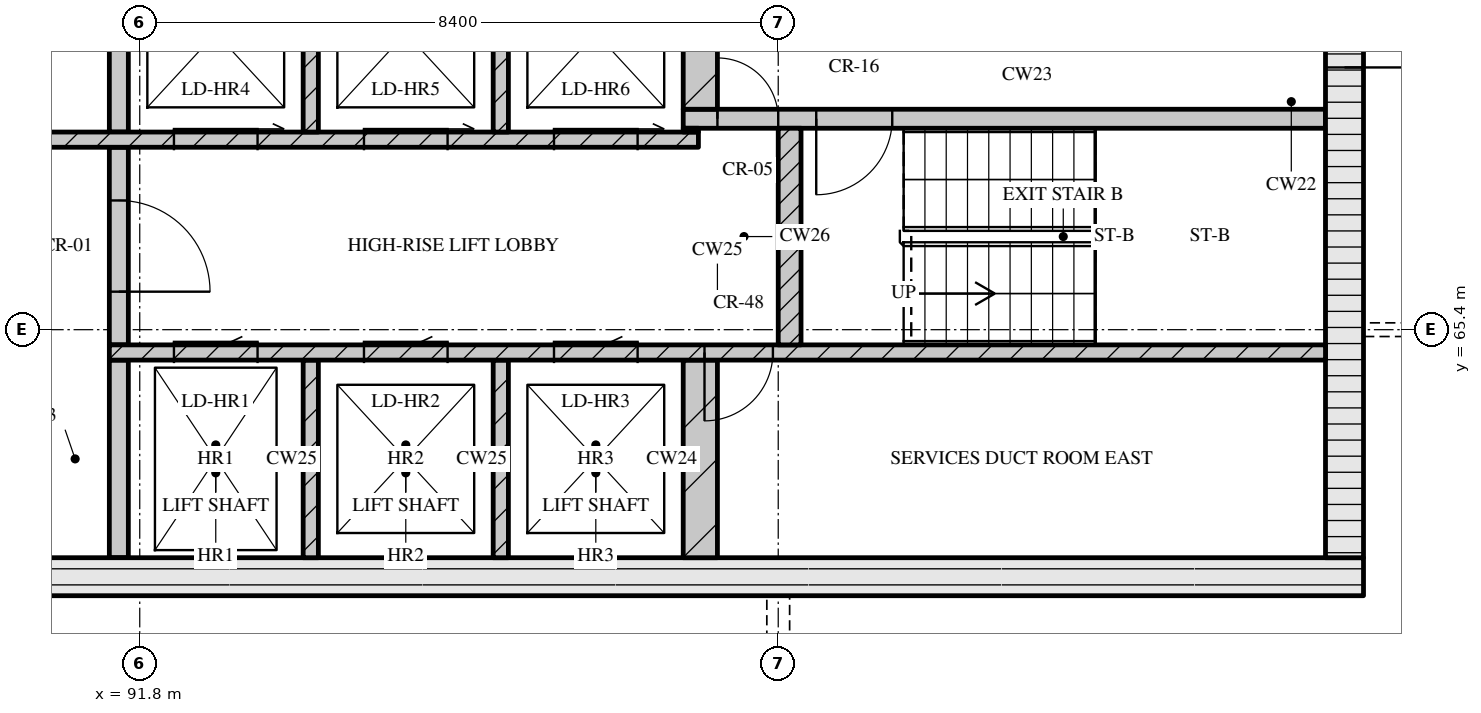
"""IFC4 building model, lengths in metres.
Left out: names, types, materials, properties, quantities, classifications, styles, units other than length and angle.
Written with IfcOpenShell. Run it as: python <this file> out.ifc"""

import sys

from ifc_helpers import new_model, si_unit, direction, frame, frame_2d, origin, place, context, subcontext, project, spatial, rectangle, extrude, element, fill, save


model = new_model("IFC4")
c1 = context("Model", 3, precision=1e-05, world=origin(), true_north=direction((0.0, 1.0)))
c2 = subcontext(c1, "Body", "Model", "MODEL_VIEW")
j1 = project(units=[si_unit("LENGTHUNIT", "METRE"), si_unit("PLANEANGLEUNIT", "RADIAN")], contexts=[c1])
p1 = place(None, origin())
s1 = spatial("IfcSite", under=j1, at=p1, CompositionType="ELEMENT")
p2 = place(p1, origin())
s2 = spatial("IfcBuilding", under=s1, at=p2, CompositionType="ELEMENT")
p3 = place(p2, frame((0.0, 0.0, 299.55)))
s3 = spatial("IfcBuildingStorey", under=s2, at=p3, CompositionType="ELEMENT", Elevation=299.55)
p4 = place(p3, frame((67.3, 62.15, 0.0), z_axis=(0.0, 0.0, 1.0), x_axis=(1.0, 0.0, 0.0)))
e1 = element("IfcWall", 1, at=p4, inside=s3, PredefinedType="SOLIDWALL", context=c2, shape_type="SweptSolid", body=[
    extrude(rectangle(XDim=40.6, YDim=0.5, at=frame_2d((20.3, 0.0))), origin(), (0.0, 0.0, 1.0), 3.32),
])
p5 = place(p4, frame((20.65, 0.0, 0.0)))
e2 = element("IfcOpeningElement", 2, at=p5, cuts=e1, PredefinedType="OPENING", context=c2, shape_type="SweptSolid", body=[
    extrude(rectangle(XDim=1.8, YDim=2.1, at=frame_2d((0.9, 1.05))), frame((0.0, 0.26, 0.0), z_axis=(0.0, -1.0, 0.0), x_axis=(1.0, 0.0, 0.0)), (0.0, 0.0, 1.0), 0.52),
])
p6 = place(p3, frame((107.65, 62.4, 0.0), z_axis=(0.0, 0.0, 1.0), x_axis=(0.0, 1.0, 0.0)))
e3 = element("IfcWall", 3, at=p6, inside=s3, PredefinedType="SOLIDWALL", context=c2, shape_type="SweptSolid", body=[
    extrude(rectangle(XDim=12.0, YDim=0.5, at=frame_2d((6.0, 0.0))), origin(), (0.0, 0.0, 1.0), 3.32),
])
p7 = place(p6, frame((6.45, 0.0, 0.0)))
e4 = element("IfcOpeningElement", 4, at=p7, cuts=e3, PredefinedType="OPENING", context=c2, shape_type="SweptSolid", body=[
    extrude(rectangle(XDim=1.2, YDim=2.1, at=frame_2d((0.6, 1.05))), frame((0.0, 0.26, 0.0), z_axis=(0.0, -1.0, 0.0), x_axis=(1.0, 0.0, 0.0)), (0.0, 0.0, 1.0), 0.52),
])
p8 = place(p3, frame((91.525, 62.4, 0.0), z_axis=(0.0, 0.0, 1.0), x_axis=(0.0, 1.0, 0.0)))
e5 = element("IfcWall", 5, at=p8, inside=s3, PredefinedType="SOLIDWALL", context=c2, shape_type="SweptSolid", body=[
    extrude(rectangle(XDim=2.6, YDim=0.25, at=frame_2d((1.3, 0.0))), origin(), (0.0, 0.0, 1.0), 3.32),
])
for number, where, z_axis, x_axis in (
    (6, (94.05, 62.4, 0.0), (0.0, 0.0, 1.0), (0.0, 1.0, 0.0)),
    (7, (96.55, 62.4, 0.0), (0.0, 0.0, 1.0), (0.0, 1.0, 0.0)),
):
    element("IfcWall", number, at=place(p3, frame(where, z_axis=z_axis, x_axis=x_axis)), inside=s3, PredefinedType="SOLIDWALL", context=c2, shape_type="SweptSolid", body=[
        extrude(rectangle(XDim=2.6, YDim=0.2, at=frame_2d((1.3, 0.0))), origin(), (0.0, 0.0, 1.0), 3.32),
    ])
p9 = place(p3, frame((99.175, 62.4, 0.0), z_axis=(0.0, 0.0, 1.0), x_axis=(0.0, 1.0, 0.0)))
e8 = element("IfcWall", 8, at=p9, inside=s3, PredefinedType="SOLIDWALL", context=c2, shape_type="SweptSolid", body=[
    extrude(rectangle(XDim=2.6, YDim=0.45, at=frame_2d((1.3, 0.0))), origin(), (0.0, 0.0, 1.0), 3.32),
])
p10 = place(p3, frame((91.4, 65.1, 0.0), z_axis=(0.0, 0.0, 1.0), x_axis=(1.0, 0.0, 0.0)))
e9 = element("IfcWall", 9, at=p10, inside=s3, PredefinedType="SOLIDWALL", context=c2, shape_type="SweptSolid", body=[
    extrude(rectangle(XDim=16.0, YDim=0.2, at=frame_2d((8.0, 0.0))), origin(), (0.0, 0.0, 1.0), 3.32),
])
p11 = place(p10, frame((0.85, 0.0, 0.0)))
e10 = element("IfcOpeningElement", 10, at=p11, cuts=e9, PredefinedType="OPENING", context=c2, shape_type="SweptSolid", body=[
    extrude(rectangle(XDim=1.1, YDim=2.1, at=frame_2d((0.55, 1.05))), frame((0.0, 0.11, 0.0), z_axis=(0.0, -1.0, 0.0), x_axis=(1.0, 0.0, 0.0)), (0.0, 0.0, 1.0), 0.22),
])
p12 = place(p10, frame((3.35, 0.0, 0.0)))
e11 = element("IfcOpeningElement", 11, at=p12, cuts=e9, PredefinedType="OPENING", context=c2, shape_type="SweptSolid", body=[
    extrude(rectangle(XDim=1.1, YDim=2.1, at=frame_2d((0.55, 1.05))), frame((0.0, 0.11, 0.0), z_axis=(0.0, -1.0, 0.0), x_axis=(1.0, 0.0, 0.0)), (0.0, 0.0, 1.0), 0.22),
])
p13 = place(p10, frame((5.85, 0.0, 0.0)))
e12 = element("IfcOpeningElement", 12, at=p13, cuts=e9, PredefinedType="OPENING", context=c2, shape_type="SweptSolid", body=[
    extrude(rectangle(XDim=1.1, YDim=2.1, at=frame_2d((0.55, 1.05))), frame((0.0, 0.11, 0.0), z_axis=(0.0, -1.0, 0.0), x_axis=(1.0, 0.0, 0.0)), (0.0, 0.0, 1.0), 0.22),
])
p14 = place(p10, frame((7.83, 0.0, 0.0)))
e13 = element("IfcOpeningElement", 13, at=p14, cuts=e9, PredefinedType="OPENING", context=c2, shape_type="SweptSolid", body=[
    extrude(rectangle(XDim=0.9, YDim=2.1, at=frame_2d((0.45, 1.05))), frame((0.0, 0.11, 0.0), z_axis=(0.0, -1.0, 0.0), x_axis=(1.0, 0.0, 0.0)), (0.0, 0.0, 1.0), 0.22),
])
p15 = place(p3, frame((91.525, 65.2, 0.0), z_axis=(0.0, 0.0, 1.0), x_axis=(0.0, 1.0, 0.0)))
e14 = element("IfcWall", 14, at=p15, inside=s3, PredefinedType="SOLIDWALL", context=c2, shape_type="SweptSolid", body=[
    extrude(rectangle(XDim=2.6, YDim=0.25, at=frame_2d((1.3, 0.0))), origin(), (0.0, 0.0, 1.0), 3.32),
])
p16 = place(p15, frame((0.7, 0.0, 0.0)))
e15 = element("IfcOpeningElement", 15, at=p16, cuts=e14, PredefinedType="OPENING", context=c2, shape_type="SweptSolid", body=[
    extrude(rectangle(XDim=1.2, YDim=2.1, at=frame_2d((0.6, 1.05))), frame((0.0, 0.135, 0.0), z_axis=(0.0, -1.0, 0.0), x_axis=(1.0, 0.0, 0.0)), (0.0, 0.0, 1.0), 0.27),
])
p17 = place(p3, frame((100.35, 65.2, 0.0), z_axis=(0.0, 0.0, 1.0), x_axis=(0.0, 1.0, 0.0)))
e16 = element("IfcWall", 16, at=p17, inside=s3, PredefinedType="SOLIDWALL", context=c2, shape_type="SweptSolid", body=[
    extrude(rectangle(XDim=2.85, YDim=0.3, at=frame_2d((1.425, 0.0))), origin(), (0.0, 0.0, 1.0), 3.32),
])
p18 = place(p3, frame((76.05, 67.9, 0.0), z_axis=(0.0, 0.0, 1.0), x_axis=(1.0, 0.0, 0.0)))
e17 = element("IfcWall", 17, at=p18, inside=s3, PredefinedType="SOLIDWALL", context=c2, shape_type="SweptSolid", body=[
    extrude(rectangle(XDim=23.1, YDim=0.2, at=frame_2d((11.55, 0.0))), origin(), (0.0, 0.0, 1.0), 3.32),
])
p19 = place(p18, frame((1.4, 0.0, 0.0)))
e18 = element("IfcOpeningElement", 18, at=p19, cuts=e17, PredefinedType="OPENING", context=c2, shape_type="SweptSolid", body=[
    extrude(rectangle(XDim=0.9, YDim=2.1, at=frame_2d((0.45, 1.05))), frame((0.0, 0.11, 0.0), z_axis=(0.0, -1.0, 0.0), x_axis=(1.0, 0.0, 0.0)), (0.0, 0.0, 1.0), 0.22),
])
p20 = place(p18, frame((5.11, 0.0, 0.0)))
e19 = element("IfcOpeningElement", 19, at=p20, cuts=e17, PredefinedType="OPENING", context=c2, shape_type="SweptSolid", body=[
    extrude(rectangle(XDim=0.9, YDim=2.1, at=frame_2d((0.45, 1.05))), frame((0.0, 0.11, 0.0), z_axis=(0.0, -1.0, 0.0), x_axis=(1.0, 0.0, 0.0)), (0.0, 0.0, 1.0), 0.22),
])
p21 = place(p18, frame((8.45, 0.0, 0.0)))
e20 = element("IfcOpeningElement", 20, at=p21, cuts=e17, PredefinedType="OPENING", context=c2, shape_type="SweptSolid", body=[
    extrude(rectangle(XDim=0.9, YDim=2.1, at=frame_2d((0.45, 1.05))), frame((0.0, 0.11, 0.0), z_axis=(0.0, -1.0, 0.0), x_axis=(1.0, 0.0, 0.0)), (0.0, 0.0, 1.0), 0.22),
])
p22 = place(p18, frame((10.91, 0.0, 0.0)))
e21 = element("IfcOpeningElement", 21, at=p22, cuts=e17, PredefinedType="OPENING", context=c2, shape_type="SweptSolid", body=[
    extrude(rectangle(XDim=0.9, YDim=2.1, at=frame_2d((0.45, 1.05))), frame((0.0, 0.11, 0.0), z_axis=(0.0, -1.0, 0.0), x_axis=(1.0, 0.0, 0.0)), (0.0, 0.0, 1.0), 0.22),
])
p23 = place(p18, frame((13.55, 0.0, 0.0)))
e22 = element("IfcOpeningElement", 22, at=p23, cuts=e17, PredefinedType="OPENING", context=c2, shape_type="SweptSolid", body=[
    extrude(rectangle(XDim=1.0, YDim=2.1, at=frame_2d((0.5, 1.05))), frame((0.0, 0.11, 0.0), z_axis=(0.0, -1.0, 0.0), x_axis=(1.0, 0.0, 0.0)), (0.0, 0.0, 1.0), 0.22),
])
p24 = place(p18, frame((16.2, 0.0, 0.0)))
e23 = element("IfcOpeningElement", 23, at=p24, cuts=e17, PredefinedType="OPENING", context=c2, shape_type="SweptSolid", body=[
    extrude(rectangle(XDim=1.1, YDim=2.1, at=frame_2d((0.55, 1.05))), frame((0.0, 0.11, 0.0), z_axis=(0.0, -1.0, 0.0), x_axis=(1.0, 0.0, 0.0)), (0.0, 0.0, 1.0), 0.22),
])
p25 = place(p18, frame((18.7, 0.0, 0.0)))
e24 = element("IfcOpeningElement", 24, at=p25, cuts=e17, PredefinedType="OPENING", context=c2, shape_type="SweptSolid", body=[
    extrude(rectangle(XDim=1.1, YDim=2.1, at=frame_2d((0.55, 1.05))), frame((0.0, 0.11, 0.0), z_axis=(0.0, -1.0, 0.0), x_axis=(1.0, 0.0, 0.0)), (0.0, 0.0, 1.0), 0.22),
])
p26 = place(p18, frame((21.2, 0.0, 0.0)))
e25 = element("IfcOpeningElement", 25, at=p26, cuts=e17, PredefinedType="OPENING", context=c2, shape_type="SweptSolid", body=[
    extrude(rectangle(XDim=1.1, YDim=2.1, at=frame_2d((0.55, 1.05))), frame((0.0, 0.11, 0.0), z_axis=(0.0, -1.0, 0.0), x_axis=(1.0, 0.0, 0.0)), (0.0, 0.0, 1.0), 0.22),
])
p27 = place(p3, frame((91.525, 68.0, 0.0), z_axis=(0.0, 0.0, 1.0), x_axis=(0.0, 1.0, 0.0)))
e26 = element("IfcWall", 26, at=p27, inside=s3, PredefinedType="SOLIDWALL", context=c2, shape_type="SweptSolid", body=[
    extrude(rectangle(XDim=2.6, YDim=0.25, at=frame_2d((1.3, 0.0))), origin(), (0.0, 0.0, 1.0), 3.32),
])
for number, where, z_axis, x_axis in (
    (27, (94.05, 68.0, 0.0), (0.0, 0.0, 1.0), (0.0, 1.0, 0.0)),
    (28, (96.55, 68.0, 0.0), (0.0, 0.0, 1.0), (0.0, 1.0, 0.0)),
):
    element("IfcWall", number, at=place(p3, frame(where, z_axis=z_axis, x_axis=x_axis)), inside=s3, PredefinedType="SOLIDWALL", context=c2, shape_type="SweptSolid", body=[
        extrude(rectangle(XDim=2.6, YDim=0.2, at=frame_2d((1.3, 0.0))), origin(), (0.0, 0.0, 1.0), 3.32),
    ])
p28 = place(p3, frame((98.95, 68.025, 0.0), z_axis=(0.0, 0.0, 1.0), x_axis=(1.0, 0.0, 0.0)))
e29 = element("IfcWall", 29, at=p28, inside=s3, PredefinedType="SOLIDWALL", context=c2, shape_type="SweptSolid", body=[
    extrude(rectangle(XDim=0.2, YDim=0.05, at=frame_2d((0.1, 0.0))), origin(), (0.0, 0.0, 1.0), 3.32),
])
p29 = place(p3, frame((98.95, 68.175, 0.0), z_axis=(0.0, 0.0, 1.0), x_axis=(1.0, 0.0, 0.0)))
e30 = element("IfcWall", 30, at=p29, inside=s3, PredefinedType="SOLIDWALL", context=c2, shape_type="SweptSolid", body=[
    extrude(rectangle(XDim=8.45, YDim=0.25, at=frame_2d((4.225, 0.0))), origin(), (0.0, 0.0, 1.0), 3.32),
])
p30 = place(p29, frame((0.45, 0.0, 0.0)))
e31 = element("IfcOpeningElement", 31, at=p30, cuts=e30, PredefinedType="OPENING", context=c2, shape_type="SweptSolid", body=[
    extrude(rectangle(XDim=0.8, YDim=2.1, at=frame_2d((0.4, 1.05))), frame((0.0, 0.135, 0.0), z_axis=(0.0, -1.0, 0.0), x_axis=(1.0, 0.0, 0.0)), (0.0, 0.0, 1.0), 0.27),
])
p31 = place(p29, frame((1.75, 0.0, 0.0)))
e32 = element("IfcOpeningElement", 32, at=p31, cuts=e30, PredefinedType="OPENING", context=c2, shape_type="SweptSolid", body=[
    extrude(rectangle(XDim=1.0, YDim=2.1, at=frame_2d((0.5, 1.05))), frame((0.0, 0.135, 0.0), z_axis=(0.0, -1.0, 0.0), x_axis=(1.0, 0.0, 0.0)), (0.0, 0.0, 1.0), 0.27),
])
p32 = place(p3, frame((99.175, 68.3, 0.0), z_axis=(0.0, 0.0, 1.0), x_axis=(0.0, 1.0, 0.0)))
e33 = element("IfcWall", 33, at=p32, inside=s3, PredefinedType="SOLIDWALL", context=c2, shape_type="SweptSolid", body=[
    extrude(rectangle(XDim=2.3, YDim=0.45, at=frame_2d((1.15, 0.0))), origin(), (0.0, 0.0, 1.0), 3.32),
])
p33 = place(p11, origin())
e34 = element("IfcDoor", 34, at=p33, inside=s3, OperationType="SLIDING_TO_LEFT", PredefinedType="DOOR", context=c2, shape_type="SweptSolid", body=[
    extrude(rectangle(XDim=1.1, YDim=2.1, at=frame_2d((0.55, 1.05))), frame((0.0, 0.025, 0.0), z_axis=(0.0, -1.0, 0.0), x_axis=(1.0, 0.0, 0.0)), (0.0, 0.0, 1.0), 0.05),
])
fill(e10, e34)
p34 = place(p12, origin())
e35 = element("IfcDoor", 35, at=p34, inside=s3, OperationType="SLIDING_TO_LEFT", PredefinedType="DOOR", context=c2, shape_type="SweptSolid", body=[
    extrude(rectangle(XDim=1.1, YDim=2.1, at=frame_2d((0.55, 1.05))), frame((0.0, 0.025, 0.0), z_axis=(0.0, -1.0, 0.0), x_axis=(1.0, 0.0, 0.0)), (0.0, 0.0, 1.0), 0.05),
])
fill(e11, e35)
p35 = place(p13, origin())
e36 = element("IfcDoor", 36, at=p35, inside=s3, OperationType="SLIDING_TO_LEFT", PredefinedType="DOOR", context=c2, shape_type="SweptSolid", body=[
    extrude(rectangle(XDim=1.1, YDim=2.1, at=frame_2d((0.55, 1.05))), frame((0.0, 0.025, 0.0), z_axis=(0.0, -1.0, 0.0), x_axis=(1.0, 0.0, 0.0)), (0.0, 0.0, 1.0), 0.05),
])
fill(e12, e36)
p36 = place(p14, origin())
e37 = element("IfcDoor", 37, at=p36, inside=s3, OperationType="SINGLE_SWING_RIGHT", PredefinedType="DOOR", context=c2, shape_type="SweptSolid", body=[
    extrude(rectangle(XDim=0.9, YDim=2.1, at=frame_2d((0.45, 1.05))), frame((0.0, 0.025, 0.0), z_axis=(0.0, -1.0, 0.0), x_axis=(1.0, 0.0, 0.0)), (0.0, 0.0, 1.0), 0.05),
])
fill(e13, e37)
p37 = place(p16, origin())
e38 = element("IfcDoor", 38, at=p37, inside=s3, OperationType="SINGLE_SWING_RIGHT", PredefinedType="DOOR", context=c2, shape_type="SweptSolid", body=[
    extrude(rectangle(XDim=1.2, YDim=2.1, at=frame_2d((0.6, 1.05))), frame((0.0, 0.025, 0.0), z_axis=(0.0, -1.0, 0.0), x_axis=(1.0, 0.0, 0.0)), (0.0, 0.0, 1.0), 0.05),
])
fill(e15, e38)
p38 = place(p24, origin())
e39 = element("IfcDoor", 39, at=p38, inside=s3, OperationType="SLIDING_TO_RIGHT", PredefinedType="DOOR", context=c2, shape_type="SweptSolid", body=[
    extrude(rectangle(XDim=1.1, YDim=2.1, at=frame_2d((0.55, 1.05))), frame((0.0, 0.025, 0.0), z_axis=(0.0, -1.0, 0.0), x_axis=(1.0, 0.0, 0.0)), (0.0, 0.0, 1.0), 0.05),
])
fill(e23, e39)
p39 = place(p25, origin())
e40 = element("IfcDoor", 40, at=p39, inside=s3, OperationType="SLIDING_TO_RIGHT", PredefinedType="DOOR", context=c2, shape_type="SweptSolid", body=[
    extrude(rectangle(XDim=1.1, YDim=2.1, at=frame_2d((0.55, 1.05))), frame((0.0, 0.025, 0.0), z_axis=(0.0, -1.0, 0.0), x_axis=(1.0, 0.0, 0.0)), (0.0, 0.0, 1.0), 0.05),
])
fill(e24, e40)
p40 = place(p26, origin())
e41 = element("IfcDoor", 41, at=p40, inside=s3, OperationType="SLIDING_TO_RIGHT", PredefinedType="DOOR", context=c2, shape_type="SweptSolid", body=[
    extrude(rectangle(XDim=1.1, YDim=2.1, at=frame_2d((0.55, 1.05))), frame((0.0, 0.025, 0.0), z_axis=(0.0, -1.0, 0.0), x_axis=(1.0, 0.0, 0.0)), (0.0, 0.0, 1.0), 0.05),
])
fill(e25, e41)
p41 = place(p30, origin())
e42 = element("IfcDoor", 42, at=p41, inside=s3, OperationType="SINGLE_SWING_LEFT", PredefinedType="DOOR", context=c2, shape_type="SweptSolid", body=[
    extrude(rectangle(XDim=0.8, YDim=2.1, at=frame_2d((0.4, 1.05))), frame((0.0, 0.025, 0.0), z_axis=(0.0, -1.0, 0.0), x_axis=(1.0, 0.0, 0.0)), (0.0, 0.0, 1.0), 0.05),
])
fill(e31, e42)
p42 = place(p31, origin())
e43 = element("IfcDoor", 43, at=p42, inside=s3, OperationType="SINGLE_SWING_RIGHT", PredefinedType="DOOR", context=c2, shape_type="SweptSolid", body=[
    extrude(rectangle(XDim=1.0, YDim=2.1, at=frame_2d((0.5, 1.05))), frame((0.0, 0.025, 0.0), z_axis=(0.0, -1.0, 0.0), x_axis=(1.0, 0.0, 0.0)), (0.0, 0.0, 1.0), 0.05),
])
fill(e32, e43)
p43 = place(p7, origin())
e44 = element("IfcDoor", 44, at=p43, inside=s3, OperationType="SINGLE_SWING_RIGHT", PredefinedType="DOOR", context=c2, shape_type="SweptSolid", body=[
    extrude(rectangle(XDim=1.2, YDim=2.1, at=frame_2d((0.6, 1.05))), frame((0.0, 0.025, 0.0), z_axis=(0.0, -1.0, 0.0), x_axis=(1.0, 0.0, 0.0)), (0.0, 0.0, 1.0), 0.05),
])
fill(e4, e44)
save(model, sys.argv[1])
